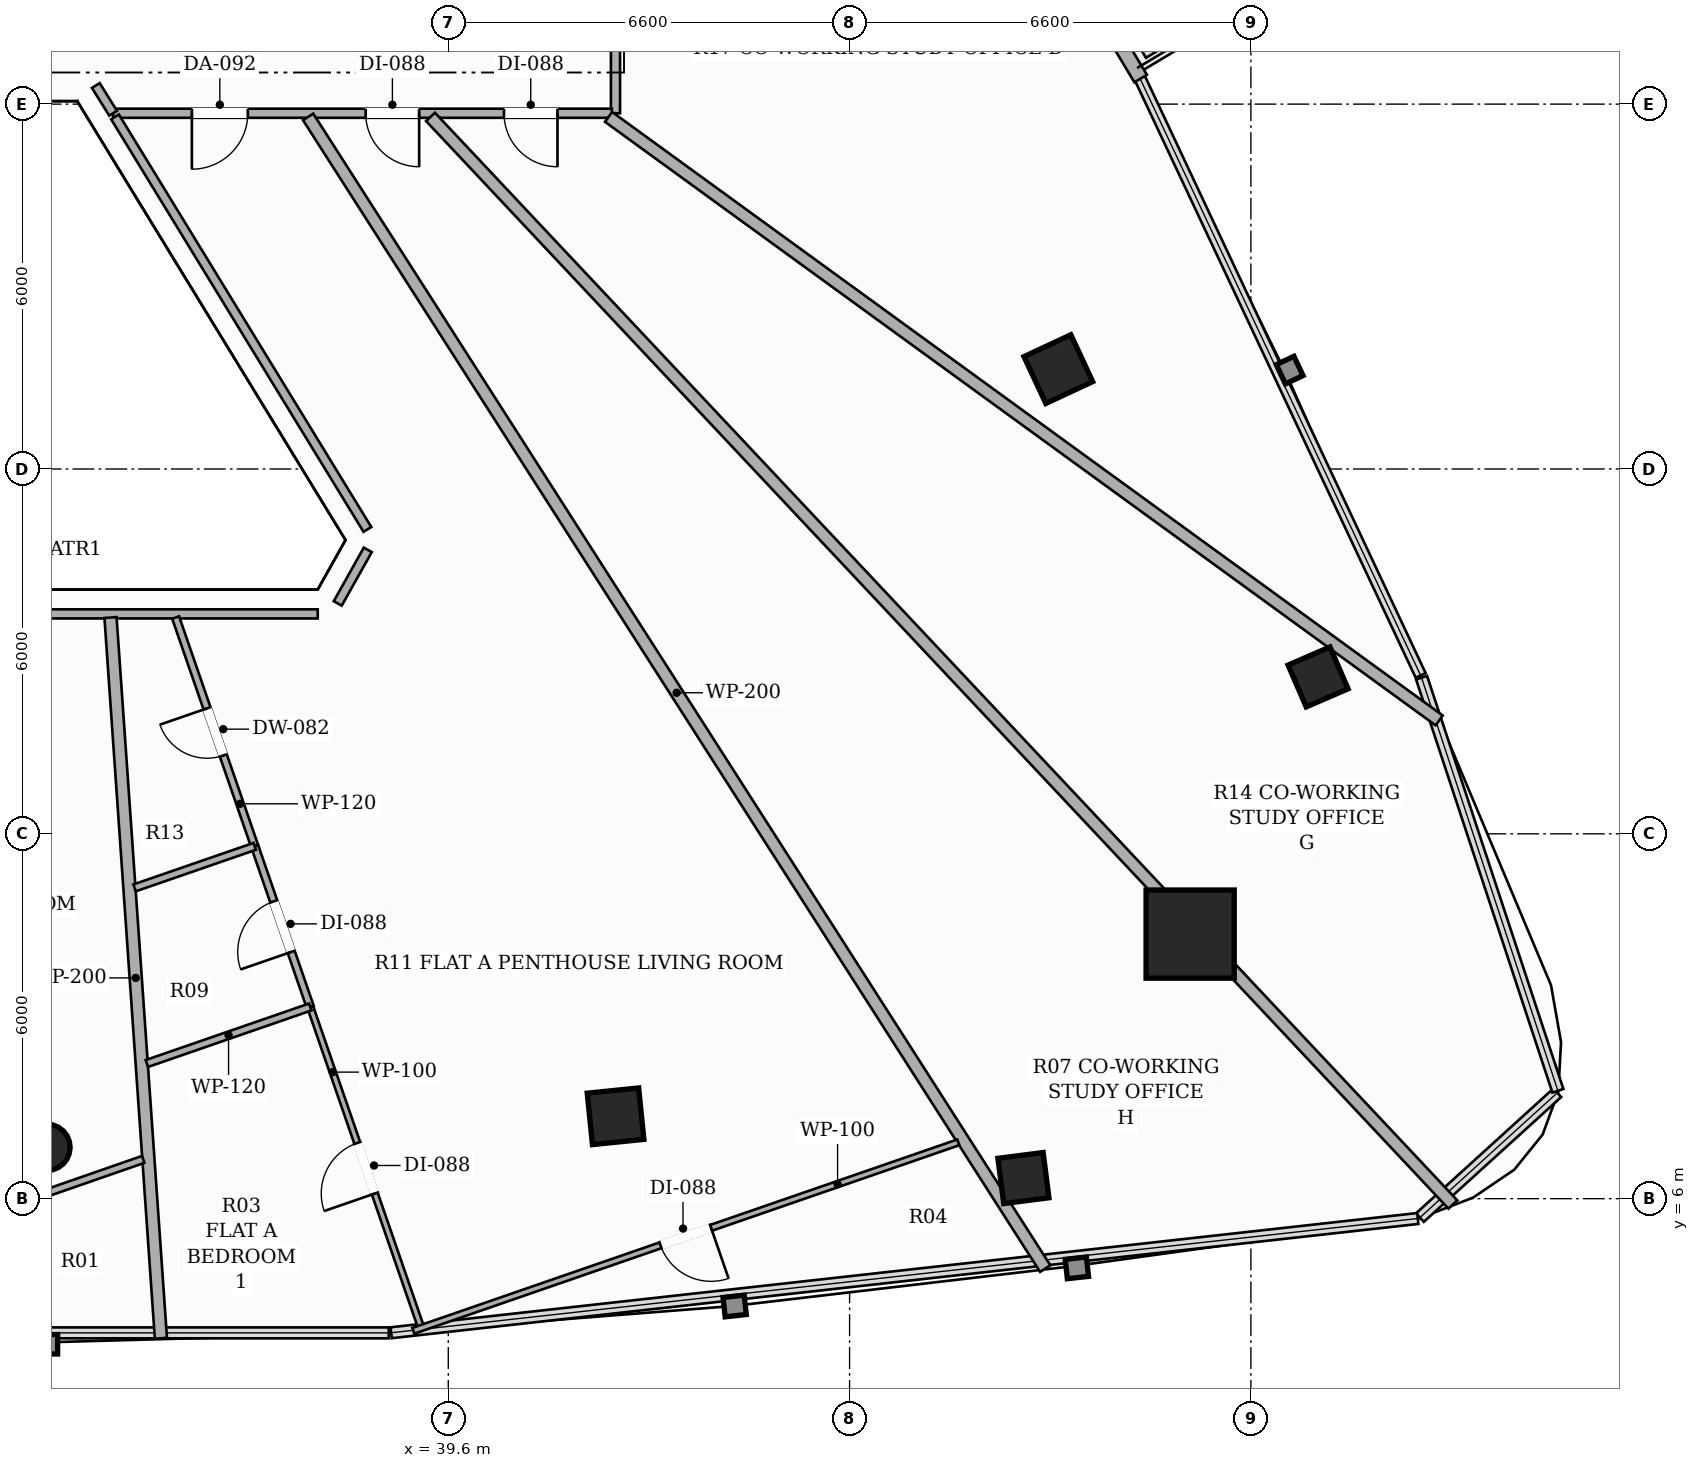
"""IFC4 building model, lengths in metres.
Left out: names, types, materials, properties, quantities, classifications, styles, units other than length and angle.
Written with IfcOpenShell. Run it as: python <this file> out.ifc"""

import sys

from ifc_helpers import new_model, si_unit, direction, frame, frame_2d, origin, origin_2d, place, context, subcontext, project, spatial, rectangle, hollow_rectangle, hollow_circle, extrude, element, fill, save


model = new_model("IFC4")
c1 = context("Model", 3, precision=1e-05, world=origin(), true_north=direction((0.0, 1.0)))
c2 = subcontext(c1, "Body", "Model", "MODEL_VIEW")
j1 = project(units=[si_unit("LENGTHUNIT", "METRE"), si_unit("PLANEANGLEUNIT", "RADIAN")], contexts=[c1])
p1 = place(None, origin())
s1 = spatial("IfcSite", under=j1, at=p1, CompositionType="ELEMENT")
p2 = place(p1, origin())
s2 = spatial("IfcBuilding", under=s1, at=p2, CompositionType="ELEMENT")
p3 = place(p2, frame((0.0, 0.0, 167.15)))
s3 = spatial("IfcBuildingStorey", under=s2, at=p3, CompositionType="ELEMENT", Elevation=167.15)
p4 = place(p3, frame((51.801, 10.351, 0.0), z_axis=(0.0, 0.0, 1.0), x_axis=(1.0, 0.0, 0.0)))
e1 = element("IfcColumn", 1, at=p4, inside=s3, PredefinedType="COLUMN", context=c2, shape_type="SweptSolid", body=[
    extrude(hollow_rectangle(XDim=1.45, YDim=1.45, WallThickness=0.045, at=origin_2d()), origin(), (0.0, 0.0, 1.0), 3.3),
])
p5 = place(p3, frame((33.0, 6.844, 0.0), z_axis=(0.0, 0.0, 1.0), x_axis=(1.0, 0.0, 0.0)))
e2 = element("IfcColumn", 2, at=p5, inside=s3, PredefinedType="COLUMN", context=c2, shape_type="SweptSolid", body=[
    extrude(hollow_circle(Radius=0.381, WallThickness=0.022, at=origin_2d()), origin(), (0.0, 0.0, 1.0), 3.3),
])
for number, where, z_axis, x_axis in (
    (3, (42.351, 7.355, 0.0), (0.0, 0.0, 1.0), (0.995, 0.101, 0.0)),
    (4, (49.633, 19.642, 0.0), (0.0, 0.0, 1.0), (-0.423, 0.906, 0.0)),
):
    element("IfcColumn", number, at=place(p3, frame(where, z_axis=z_axis, x_axis=x_axis)), inside=s3, PredefinedType="COLUMN", context=c2, shape_type="SweptSolid", body=[
        extrude(hollow_rectangle(XDim=0.85, YDim=0.85, WallThickness=0.028, at=origin_2d()), origin(), (0.0, 0.0, 1.0), 3.3),
    ])
for number, where, z_axis, x_axis in (
    (5, (49.059, 6.339, 0.0), (0.0, 0.0, 1.0), (0.992, 0.127, 0.0)),
    (6, (53.905, 14.58, 0.0), (0.0, 0.0, 1.0), (-0.397, 0.918, 0.0)),
):
    element("IfcColumn", number, at=place(p3, frame(where, z_axis=z_axis, x_axis=x_axis)), inside=s3, PredefinedType="COLUMN", context=c2, shape_type="SweptSolid", body=[
        extrude(hollow_rectangle(XDim=0.75, YDim=0.75, WallThickness=0.025, at=origin_2d()), origin(), (0.0, 0.0, 1.0), 3.3),
    ])
p6 = place(p3, frame((50.987, 24.421, 0.0), z_axis=(0.0, 0.0, 1.0), x_axis=(-0.514334017412, 0.85758994778, 0.0)))
e7 = element("IfcWall", 7, at=p6, inside=s3, PredefinedType="SOLIDWALL", context=c2, shape_type="SweptSolid", body=[
    extrude(rectangle(XDim=11.1, YDim=0.24, at=frame_2d((5.55, 0.0))), origin(), (0.0, 0.0, 1.0), 2.624),
])
p7 = place(p6, frame((8.602, 0.0, 0.0)))
e8 = element("IfcOpeningElement", 8, at=p7, cuts=e7, PredefinedType="OPENING", context=c2, shape_type="SweptSolid", body=[
    extrude(rectangle(XDim=1.8, YDim=2.2, at=frame_2d((0.9, 1.1))), frame((0.0, 0.13, 0.0), z_axis=(0.0, -1.0, 0.0), x_axis=(1.0, 0.0, 0.0)), (0.0, 0.0, 1.0), 0.26),
])
p8 = place(p3, frame((42.35, 28.34, 0.0), z_axis=(0.0, 0.0, 1.0), x_axis=(0.0, -1.0, 0.0)))
e9 = element("IfcWall", 9, at=p8, inside=s3, PredefinedType="PARTITIONING", context=c2, shape_type="SweptSolid", body=[
    extrude(rectangle(XDim=4.49, YDim=0.15, at=frame_2d((2.245, 0.0))), origin(), (0.0, 0.0, 1.0), 2.721),
])
p9 = place(p8, frame((1.805, 0.0, 0.0)))
e10 = element("IfcOpeningElement", 10, at=p9, cuts=e9, PredefinedType="OPENING", context=c2, shape_type="SweptSolid", body=[
    extrude(rectangle(XDim=0.88, YDim=2.1, at=frame_2d((0.44, 1.05))), frame((0.0, 0.085, 0.0), z_axis=(0.0, -1.0, 0.0), x_axis=(1.0, 0.0, 0.0)), (0.0, 0.0, 1.0), 0.17),
])
p10 = place(p3, frame((42.29, 23.85, 0.0), z_axis=(0.0, 0.0, 1.0), x_axis=(-1.0, 0.0, 0.0)))
e11 = element("IfcWall", 11, at=p10, inside=s3, PredefinedType="PARTITIONING", context=c2, shape_type="SweptSolid", body=[
    extrude(rectangle(XDim=8.202, YDim=0.15, at=frame_2d((4.101, 0.0))), origin(), (0.0, 0.0, 1.0), 2.492),
])
p11 = place(p10, frame((5.987, 0.0, 0.0)))
e12 = element("IfcOpeningElement", 12, at=p11, cuts=e11, PredefinedType="OPENING", context=c2, shape_type="SweptSolid", body=[
    extrude(rectangle(XDim=0.92, YDim=2.15, at=frame_2d((0.46, 1.075))), frame((0.0, 0.085, 0.0), z_axis=(0.0, -1.0, 0.0), x_axis=(1.0, 0.0, 0.0)), (0.0, 0.0, 1.0), 0.17),
])
p12 = place(p10, frame((0.894, 0.0, 0.0)))
e13 = element("IfcOpeningElement", 13, at=p12, cuts=e11, PredefinedType="OPENING", context=c2, shape_type="SweptSolid", body=[
    extrude(rectangle(XDim=0.88, YDim=2.1, at=frame_2d((0.44, 1.05))), frame((0.0, 0.085, 0.0), z_axis=(0.0, -1.0, 0.0), x_axis=(1.0, 0.0, 0.0)), (0.0, 0.0, 1.0), 0.17),
])
p13 = place(p10, frame((3.169, 0.0, 0.0)))
e14 = element("IfcOpeningElement", 14, at=p13, cuts=e11, PredefinedType="OPENING", context=c2, shape_type="SweptSolid", body=[
    extrude(rectangle(XDim=0.88, YDim=2.1, at=frame_2d((0.44, 1.05))), frame((0.0, 0.085, 0.0), z_axis=(0.0, -1.0, 0.0), x_axis=(1.0, 0.0, 0.0)), (0.0, 0.0, 1.0), 0.17),
])
p14 = place(p3, frame((34.088, 23.85, 0.0), z_axis=(0.0, 0.0, 1.0), x_axis=(-0.530039765459, 0.847972786728, 0.0)))
e15 = element("IfcWall", 15, at=p14, inside=s3, PredefinedType="PARTITIONING", context=c2, shape_type="SweptSolid", body=[
    extrude(rectangle(XDim=0.538, YDim=0.15, at=frame_2d((0.269, 0.0))), origin(), (0.0, 0.0, 1.0), 3.06),
])
p15 = place(p3, frame((34.119, 23.79, 0.0), z_axis=(0.0, 0.0, 1.0), x_axis=(0.521942869651, -0.852980445744, 0.0)))
e16 = element("IfcWall", 16, at=p15, inside=s3, PredefinedType="PARTITIONING", context=c2, shape_type="SweptSolid", body=[
    extrude(rectangle(XDim=7.953, YDim=0.15, at=frame_2d((3.977, 0.0))), origin(), (0.0, 0.0, 1.0), 2.721),
])
p16 = place(p3, frame((38.276, 16.67, 0.0), z_axis=(0.0, 0.0, 1.0), x_axis=(-0.489067077696, -0.872246177127, 0.0)))
e17 = element("IfcWall", 17, at=p16, inside=s3, PredefinedType="PARTITIONING", context=c2, shape_type="SweptSolid", body=[
    extrude(rectangle(XDim=1.01, YDim=0.15, at=frame_2d((0.505, 0.0))), origin(), (0.0, 0.0, 1.0), 3.06),
])
p17 = place(p3, frame((37.453, 15.617, 0.0), z_axis=(0.0, 0.0, 1.0), x_axis=(-1.0, 0.0, 0.0)))
e18 = element("IfcWall", 18, at=p17, inside=s3, PredefinedType="PARTITIONING", context=c2, shape_type="SweptSolid", body=[
    extrude(rectangle(XDim=8.906, YDim=0.15, at=frame_2d((4.453, 0.0))), origin(), (0.0, 0.0, 1.0), 2.721),
])
p18 = place(p3, frame((34.874, 3.704, 0.0), z_axis=(0.0, 0.0, 1.0), x_axis=(-0.069779440561, 0.997562443998, 0.0)))
e19 = element("IfcWall", 19, at=p18, inside=s3, PredefinedType="PARTITIONING", context=c2, shape_type="SweptSolid", body=[
    extrude(rectangle(XDim=11.882, YDim=0.2, at=frame_2d((5.941, 0.0))), origin(), (0.0, 0.0, 1.0), 2.413),
])
p19 = place(p3, frame((37.295, 23.79, 0.0), z_axis=(0.0, 0.0, 1.0), x_axis=(0.539100523601, -0.842241429433, 0.0)))
e20 = element("IfcWall", 20, at=p19, inside=s3, PredefinedType="PARTITIONING", context=c2, shape_type="SweptSolid", body=[
    extrude(rectangle(XDim=22.488, YDim=0.2, at=frame_2d((11.244, 0.0))), origin(), (0.0, 0.0, 1.0), 2.413),
])
p20 = place(p3, frame((55.896, 13.865, 0.0), z_axis=(0.0, 0.0, 1.0), x_axis=(-0.809001736781, 0.587806251995, 0.0)))
e21 = element("IfcWall", 21, at=p20, inside=s3, PredefinedType="PARTITIONING", context=c2, shape_type="SweptSolid", body=[
    extrude(rectangle(XDim=16.885, YDim=0.2, at=frame_2d((8.442, 0.0))), origin(), (0.0, 0.0, 1.0), 2.413),
])
p21 = place(p3, frame((56.122, 5.904, 0.0), z_axis=(0.0, 0.0, 1.0), x_axis=(-0.684934612975, 0.728604540165, 0.0)))
e22 = element("IfcWall", 22, at=p21, inside=s3, PredefinedType="PARTITIONING", context=c2, shape_type="SweptSolid", body=[
    extrude(rectangle(XDim=24.548, YDim=0.2, at=frame_2d((12.274, 0.0))), origin(), (0.0, 0.0, 1.0), 2.413),
])
p22 = place(p3, frame((36.417, 11.794, 0.0), z_axis=(0.0, 0.0, 1.0), x_axis=(-0.326767254884, 0.945104841346, 0.0)))
e23 = element("IfcWall", 23, at=p22, inside=s3, PredefinedType="PARTITIONING", context=c2, shape_type="SweptSolid", body=[
    extrude(rectangle(XDim=3.981, YDim=0.12, at=frame_2d((1.991, 0.0))), origin(), (0.0, 0.0, 1.0), 3.06),
])
p23 = place(p22, frame((1.581, 0.0, 0.0)))
e24 = element("IfcOpeningElement", 24, at=p23, cuts=e23, PredefinedType="OPENING", context=c2, shape_type="SweptSolid", body=[
    extrude(rectangle(XDim=0.82, YDim=2.1, at=frame_2d((0.41, 1.05))), frame((0.0, 0.07, 0.0), z_axis=(0.0, -1.0, 0.0), x_axis=(1.0, 0.0, 0.0)), (0.0, 0.0, 1.0), 0.14),
])
p24 = place(p3, frame((37.33, 9.152, 0.0), z_axis=(0.0, 0.0, 1.0), x_axis=(-0.326663542442, 0.945140693251, 0.0)))
e25 = element("IfcWall", 25, at=p24, inside=s3, PredefinedType="PARTITIONING", context=c2, shape_type="SweptSolid", body=[
    extrude(rectangle(XDim=2.795, YDim=0.12, at=frame_2d((1.397, 0.0))), origin(), (0.0, 0.0, 1.0), 2.721),
])
p25 = place(p24, frame((0.958, 0.0, 0.0)))
e26 = element("IfcOpeningElement", 26, at=p25, cuts=e25, PredefinedType="OPENING", context=c2, shape_type="SweptSolid", body=[
    extrude(rectangle(XDim=0.88, YDim=2.1, at=frame_2d((0.44, 1.05))), frame((0.0, 0.07, 0.0), z_axis=(0.0, -1.0, 0.0), x_axis=(1.0, 0.0, 0.0)), (0.0, 0.0, 1.0), 0.14),
])
p26 = place(p3, frame((39.164, 3.848, 0.0), z_axis=(0.0, 0.0, 1.0), x_axis=(-0.326778856457, 0.945100830056, 0.0)))
e27 = element("IfcWall", 27, at=p26, inside=s3, PredefinedType="PARTITIONING", context=c2, shape_type="SweptSolid", body=[
    extrude(rectangle(XDim=5.612, YDim=0.1, at=frame_2d((2.806, 0.0))), origin(), (0.0, 0.0, 1.0), 2.413),
])
p27 = place(p26, frame((2.366, 0.0, 0.0)))
e28 = element("IfcOpeningElement", 28, at=p27, cuts=e27, PredefinedType="OPENING", context=c2, shape_type="SweptSolid", body=[
    extrude(rectangle(XDim=0.88, YDim=2.1, at=frame_2d((0.44, 1.05))), frame((0.0, 0.06, 0.0), z_axis=(0.0, -1.0, 0.0), x_axis=(1.0, 0.0, 0.0)), (0.0, 0.0, 1.0), 0.12),
])
p28 = place(p3, frame((47.988, 6.926, 0.0), z_axis=(0.0, 0.0, 1.0), x_axis=(-0.945100175753, -0.326780748809, 0.0)))
e29 = element("IfcWall", 29, at=p28, inside=s3, PredefinedType="PARTITIONING", context=c2, shape_type="SweptSolid", body=[
    extrude(rectangle(XDim=9.484, YDim=0.1, at=frame_2d((4.742, 0.0))), origin(), (0.0, 0.0, 1.0), 2.413),
])
p29 = place(p28, frame((4.302, 0.0, 0.0)))
e30 = element("IfcOpeningElement", 30, at=p29, cuts=e29, PredefinedType="OPENING", context=c2, shape_type="SweptSolid", body=[
    extrude(rectangle(XDim=0.88, YDim=2.1, at=frame_2d((0.44, 1.05))), frame((0.0, 0.06, 0.0), z_axis=(0.0, -1.0, 0.0), x_axis=(1.0, 0.0, 0.0)), (0.0, 0.0, 1.0), 0.12),
])
p30 = place(p3, frame((36.417, 11.794, 0.0), z_axis=(0.0, 0.0, 1.0), x_axis=(-0.945158093584, -0.326613193446, 0.0)))
e31 = element("IfcWall", 31, at=p30, inside=s3, PredefinedType="PARTITIONING", context=c2, shape_type="SweptSolid", body=[
    extrude(rectangle(XDim=2.091, YDim=0.12, at=frame_2d((1.045, 0.0))), origin(), (0.0, 0.0, 1.0), 3.06),
])
p31 = place(p3, frame((37.33, 9.152, 0.0), z_axis=(0.0, 0.0, 1.0), x_axis=(-0.945086078656, -0.326821516933, 0.0)))
e32 = element("IfcWall", 32, at=p31, inside=s3, PredefinedType="PARTITIONING", context=c2, shape_type="SweptSolid", body=[
    extrude(rectangle(XDim=2.843, YDim=0.12, at=frame_2d((1.422, 0.0))), origin(), (0.0, 0.0, 1.0), 2.721),
])
p32 = place(p3, frame((34.583, 6.646, 0.0), z_axis=(0.0, 0.0, 1.0), x_axis=(-0.944539899325, -0.328396678704, 0.0)))
e33 = element("IfcWall", 33, at=p32, inside=s3, PredefinedType="PARTITIONING", context=c2, shape_type="SweptSolid", body=[
    extrude(rectangle(XDim=8.48, YDim=0.12, at=frame_2d((4.24, 0.0))), origin(), (0.0, 0.0, 1.0), 2.413),
])
p33 = place(p32, frame((3.83, 0.0, 0.0)))
e34 = element("IfcOpeningElement", 34, at=p33, cuts=e33, PredefinedType="OPENING", context=c2, shape_type="SweptSolid", body=[
    extrude(rectangle(XDim=0.82, YDim=2.1, at=frame_2d((0.41, 1.05))), frame((0.0, 0.07, 0.0), z_axis=(0.0, -1.0, 0.0), x_axis=(1.0, 0.0, 0.0)), (0.0, 0.0, 1.0), 0.14),
])
p34 = place(p11, origin())
e35 = element("IfcDoor", 35, at=p34, inside=s3, OperationType="SINGLE_SWING_RIGHT", PredefinedType="DOOR", context=c2, shape_type="SweptSolid", body=[
    extrude(rectangle(XDim=0.92, YDim=2.15, at=frame_2d((0.46, 1.075))), frame((0.0, 0.025, 0.0), z_axis=(0.0, -1.0, 0.0), x_axis=(1.0, 0.0, 0.0)), (0.0, 0.0, 1.0), 0.05),
])
fill(e12, e35)
p35 = place(p23, origin())
e36 = element("IfcDoor", 36, at=p35, inside=s3, OperationType="SINGLE_SWING_RIGHT", PredefinedType="DOOR", context=c2, shape_type="SweptSolid", body=[
    extrude(rectangle(XDim=0.82, YDim=2.1, at=frame_2d((0.41, 1.05))), frame((0.0, 0.025, 0.0), z_axis=(0.0, -1.0, 0.0), x_axis=(1.0, 0.0, 0.0)), (0.0, 0.0, 1.0), 0.05),
])
fill(e24, e36)
p36 = place(p25, origin())
e37 = element("IfcDoor", 37, at=p36, inside=s3, OperationType="SINGLE_SWING_LEFT", PredefinedType="DOOR", context=c2, shape_type="SweptSolid", body=[
    extrude(rectangle(XDim=0.88, YDim=2.1, at=frame_2d((0.44, 1.05))), frame((0.0, 0.025, 0.0), z_axis=(0.0, -1.0, 0.0), x_axis=(1.0, 0.0, 0.0)), (0.0, 0.0, 1.0), 0.05),
])
fill(e26, e37)
p37 = place(p27, origin())
e38 = element("IfcDoor", 38, at=p37, inside=s3, OperationType="SINGLE_SWING_LEFT", PredefinedType="DOOR", context=c2, shape_type="SweptSolid", body=[
    extrude(rectangle(XDim=0.88, YDim=2.1, at=frame_2d((0.44, 1.05))), frame((0.0, 0.025, 0.0), z_axis=(0.0, -1.0, 0.0), x_axis=(1.0, 0.0, 0.0)), (0.0, 0.0, 1.0), 0.05),
])
fill(e28, e38)
p38 = place(p29, origin())
e39 = element("IfcDoor", 39, at=p38, inside=s3, OperationType="SINGLE_SWING_LEFT", PredefinedType="DOOR", context=c2, shape_type="SweptSolid", body=[
    extrude(rectangle(XDim=0.88, YDim=2.1, at=frame_2d((0.44, 1.05))), frame((0.0, 0.025, 0.0), z_axis=(0.0, -1.0, 0.0), x_axis=(1.0, 0.0, 0.0)), (0.0, 0.0, 1.0), 0.05),
])
fill(e30, e39)
p39 = place(p12, origin())
e40 = element("IfcDoor", 40, at=p39, inside=s3, OperationType="SINGLE_SWING_LEFT", PredefinedType="DOOR", context=c2, shape_type="SweptSolid", body=[
    extrude(rectangle(XDim=0.88, YDim=2.1, at=frame_2d((0.44, 1.05))), frame((0.0, 0.025, 0.0), z_axis=(0.0, -1.0, 0.0), x_axis=(1.0, 0.0, 0.0)), (0.0, 0.0, 1.0), 0.05),
])
fill(e13, e40)
p40 = place(p13, origin())
e41 = element("IfcDoor", 41, at=p40, inside=s3, OperationType="SINGLE_SWING_LEFT", PredefinedType="DOOR", context=c2, shape_type="SweptSolid", body=[
    extrude(rectangle(XDim=0.88, YDim=2.1, at=frame_2d((0.44, 1.05))), frame((0.0, 0.025, 0.0), z_axis=(0.0, -1.0, 0.0), x_axis=(1.0, 0.0, 0.0)), (0.0, 0.0, 1.0), 0.05),
])
fill(e14, e41)
save(model, sys.argv[1])
